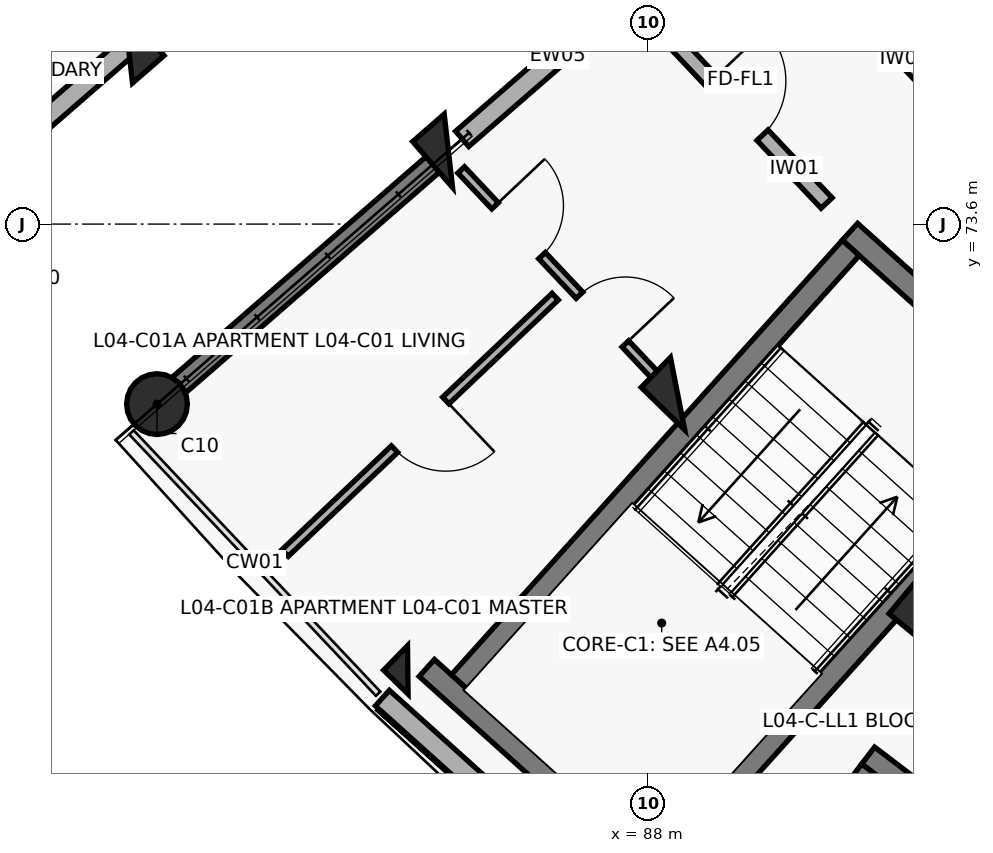
"""IFC4 building model, lengths in metres.
Left out: names, types, materials, properties, quantities, classifications, styles, units other than length and angle.
Written with IfcOpenShell. Run it as: python <this file> out.ifc"""

import sys

from ifc_helpers import new_model, si_unit, direction, frame, frame_2d, origin, origin_2d, place, context, subcontext, project, spatial, rectangle, circle, extrude, element, fill, save


model = new_model("IFC4")
c1 = context("Model", 3, precision=1e-05, world=origin(), true_north=direction((0.0, 1.0)))
c2 = subcontext(c1, "Body", "Model", "MODEL_VIEW")
j1 = project(units=[si_unit("LENGTHUNIT", "METRE"), si_unit("PLANEANGLEUNIT", "RADIAN")], contexts=[c1])
p1 = place(None, origin())
s1 = spatial("IfcSite", under=j1, at=p1, CompositionType="ELEMENT")
p2 = place(p1, origin())
s2 = spatial("IfcBuilding", under=s1, at=p2, CompositionType="ELEMENT")
p3 = place(p2, frame((0.0, 0.0, 14.3)))
s3 = spatial("IfcBuildingStorey", under=s2, at=p3, CompositionType="ELEMENT", Elevation=14.3)
for number, where, z_axis, x_axis in (
    (1, (81.166, 75.938, 0.0), (0.0, 0.0, 1.0), (0.755, 0.656, 0.0)),
    (2, (85.377, 74.564, 0.0), (0.0, 0.0, 1.0), (-0.755, -0.656, 0.0)),
):
    element("IfcColumn", number, at=place(p3, frame(where, z_axis=z_axis, x_axis=x_axis)), inside=s3, PredefinedType="COLUMN", context=c2, shape_type="SweptSolid", body=[
        extrude(rectangle(XDim=0.55, YDim=0.8, at=origin_2d()), origin(), (0.0, 0.0, 1.0), 3.1),
    ])
p4 = place(p3, frame((81.543, 71.231, 0.0), z_axis=(0.0, 0.0, 1.0), x_axis=(-0.754709580223, -0.656059028991, 0.0)))
e3 = element("IfcColumn", 3, at=p4, inside=s3, PredefinedType="COLUMN", context=c2, shape_type="SweptSolid", body=[
    extrude(circle(Radius=0.4, at=origin_2d()), origin(), (0.0, 0.0, 1.0), 3.1),
])
p5 = place(p3, frame((88.392, 71.369, 0.0), z_axis=(0.0, 0.0, 1.0), x_axis=(-0.698665066769, -0.715448897181, 0.0)))
e4 = element("IfcColumn", 4, at=p5, inside=s3, PredefinedType="COLUMN", context=c2, shape_type="SweptSolid", body=[
    extrude(rectangle(XDim=0.55, YDim=0.8, at=origin_2d()), origin(), (0.0, 0.0, 1.0), 3.1),
])
p6 = place(p3, frame((84.843, 67.734, 0.0), z_axis=(0.0, 0.0, 1.0), x_axis=(-0.698665066769, -0.715448897181, 0.0)))
e5 = element("IfcColumn", 5, at=p6, inside=s3, PredefinedType="COLUMN", context=c2, shape_type="SweptSolid", body=[
    extrude(rectangle(XDim=0.45, YDim=0.45, at=origin_2d()), origin(), (0.0, 0.0, 1.0), 3.1),
])
p7 = place(p3, frame((91.658, 68.43, 0.0), z_axis=(0.0, 0.0, 1.0), x_axis=(-0.637961754089, -0.770068049148, 0.0)))
e6 = element("IfcColumn", 6, at=p7, inside=s3, PredefinedType="COLUMN", context=c2, shape_type="SweptSolid", body=[
    extrude(rectangle(XDim=0.55, YDim=0.8, at=origin_2d()), origin(), (0.0, 0.0, 1.0), 3.1),
])
p8 = place(p3, frame((85.241, 74.446, 0.0), z_axis=(0.0, 0.0, 1.0), x_axis=(-0.754703505217, -0.65606601742, 0.0)))
e7 = element("IfcWall", 7, at=p8, inside=s3, PredefinedType="SHEAR", context=c2, shape_type="SweptSolid", body=[
    extrude(rectangle(XDim=4.72, YDim=0.27, at=frame_2d((2.36, 0.0))), origin(), (0.0, 0.0, 1.0), 2.86),
])
p9 = place(p3, frame((79.234, 74.259, 0.0), z_axis=(0.0, 0.0, 1.0), x_axis=(0.754717680958, 0.656049710044, 0.0)))
e8 = element("IfcWall", 8, at=p9, inside=s3, PredefinedType="SOLIDWALL", context=c2, shape_type="SweptSolid", body=[
    extrude(rectangle(XDim=8.2, YDim=0.265, at=frame_2d((4.1, 0.0))), origin(), (0.0, 0.0, 1.0), 2.08),
])
p10 = place(p9, frame((3.59, 0.0, 0.75)))
e9 = element("IfcOpeningElement", 9, at=p10, cuts=e8, PredefinedType="OPENING", context=c2, shape_type="SweptSolid", body=[
    extrude(rectangle(XDim=1.35, YDim=1.35, at=frame_2d((0.675, 0.675))), frame((0.0, 0.142, 0.0), z_axis=(0.0, -1.0, 0.0), x_axis=(1.0, 0.0, 0.0)), (0.0, 0.0, 1.0), 0.285),
])
p11 = place(p3, frame((84.508, 67.363, 0.0), z_axis=(0.0, 0.0, 1.0), x_axis=(0.743387539862, -0.668860946369, 0.0)))
e10 = element("IfcWall", 10, at=p11, inside=s3, PredefinedType="SOLIDWALL", context=c2, shape_type="SweptSolid", body=[
    extrude(rectangle(XDim=4.809, YDim=0.275, at=frame_2d((2.405, 0.0))), origin(), (0.0, 0.0, 1.0), 2.25),
])
p12 = place(p3, frame((91.746, 80.101, 0.0), z_axis=(0.0, 0.0, 1.0), x_axis=(-0.754704866158, -0.656064451862, 0.0)))
e11 = element("IfcWall", 11, at=p12, inside=s3, PredefinedType="SOLIDWALL", context=c2, shape_type="SweptSolid", body=[
    extrude(rectangle(XDim=8.2, YDim=0.265, at=frame_2d((4.1, 0.0))), origin(), (0.0, 0.0, 1.0), 2.08),
])
p13 = place(p12, frame((3.59, 0.0, 0.75)))
e12 = element("IfcOpeningElement", 12, at=p13, cuts=e11, PredefinedType="OPENING", context=c2, shape_type="SweptSolid", body=[
    extrude(rectangle(XDim=1.35, YDim=1.35, at=frame_2d((0.675, 0.675))), frame((0.0, 0.142, 0.0), z_axis=(0.0, -1.0, 0.0), x_axis=(1.0, 0.0, 0.0)), (0.0, 0.0, 1.0), 0.285),
])
p14 = place(p3, frame((90.66, 73.499, 0.0), z_axis=(0.0, 0.0, 1.0), x_axis=(0.743375696158, -0.668874109501, 0.0)))
e13 = element("IfcWall", 13, at=p14, inside=s3, PredefinedType="SHEAR", context=c2, shape_type="SweptSolid", body=[
    extrude(rectangle(XDim=3.87, YDim=0.3, at=frame_2d((1.935, 0.0))), origin(), (0.0, 0.0, 1.0), 3.1),
])
p15 = place(p14, frame((1.41, 0.0, 0.0)))
e14 = element("IfcOpeningElement", 14, at=p15, cuts=e13, PredefinedType="OPENING", context=c2, shape_type="SweptSolid", body=[
    extrude(rectangle(XDim=1.05, YDim=2.15, at=frame_2d((0.525, 1.075))), frame((0.0, 0.16, 0.0), z_axis=(0.0, -1.0, 0.0), x_axis=(1.0, 0.0, 0.0)), (0.0, 0.0, 1.0), 0.32),
])
p16 = place(p3, frame((85.093, 67.76, 0.0), z_axis=(0.0, 0.0, 1.0), x_axis=(0.743372896184, -0.668877221333, 0.0)))
e15 = element("IfcWall", 15, at=p16, inside=s3, PredefinedType="SHEAR", context=c2, shape_type="SweptSolid", body=[
    extrude(rectangle(XDim=4.47, YDim=0.3, at=frame_2d((2.235, 0.0))), origin(), (0.0, 0.0, 1.0), 3.1),
])
p17 = place(p3, frame((90.671, 73.287, 0.0), z_axis=(0.0, 0.0, 1.0), x_axis=(-0.668885797871, -0.743365179038, 0.0)))
e16 = element("IfcWall", 16, at=p17, inside=s3, PredefinedType="SHEAR", context=c2, shape_type="SweptSolid", body=[
    extrude(rectangle(XDim=7.69, YDim=0.3, at=frame_2d((3.845, 0.0))), origin(), (0.0, 0.0, 1.0), 3.1),
])
p18 = place(p3, frame((93.325, 70.899, 0.0), z_axis=(0.0, 0.0, 1.0), x_axis=(-0.668868253964, -0.743380964808, 0.0)))
e17 = element("IfcWall", 17, at=p18, inside=s3, PredefinedType="SHEAR", context=c2, shape_type="SweptSolid", body=[
    extrude(rectangle(XDim=7.69, YDim=0.3, at=frame_2d((3.845, 0.0))), origin(), (0.0, 0.0, 1.0), 3.1),
])
p19 = place(p3, frame((90.899, 66.607, 0.0), z_axis=(0.0, 0.0, 1.0), x_axis=(0.795439986025, -0.606032365994, 0.0)))
e18 = element("IfcWall", 18, at=p19, inside=s3, PredefinedType="SHEAR", context=c2, shape_type="SweptSolid", body=[
    extrude(rectangle(XDim=3.39, YDim=0.28, at=frame_2d((1.695, 0.0))), origin(), (0.0, 0.0, 1.0), 3.1),
])
p20 = place(p19, frame((1.095, 0.0, 0.0)))
e19 = element("IfcOpeningElement", 19, at=p20, cuts=e18, PredefinedType="OPENING", context=c2, shape_type="SweptSolid", body=[
    extrude(rectangle(XDim=1.2, YDim=2.15, at=frame_2d((0.6, 1.075))), frame((0.0, 0.15, 0.0), z_axis=(0.0, -1.0, 0.0), x_axis=(1.0, 0.0, 0.0)), (0.0, 0.0, 1.0), 0.3),
])
p21 = place(p3, frame((90.926, 66.411, 0.0), z_axis=(0.0, 0.0, 1.0), x_axis=(-0.605948992168, -0.795503500238, 0.0)))
e20 = element("IfcWall", 20, at=p21, inside=s3, PredefinedType="SHEAR", context=c2, shape_type="SweptSolid", body=[
    extrude(rectangle(XDim=2.03, YDim=0.28, at=frame_2d((1.015, 0.0))), origin(), (0.0, 0.0, 1.0), 3.1),
])
p22 = place(p3, frame((87.994, 76.376, 0.0), z_axis=(0.0, 0.0, 1.0), x_axis=(0.686310507227, -0.727308660522, 0.0)))
e21 = element("IfcWall", 21, at=p22, inside=s3, PredefinedType="SOLIDWALL", context=c2, shape_type="SweptSolid", body=[
    extrude(rectangle(XDim=3.436, YDim=0.2, at=frame_2d((1.718, 0.0))), origin(), (0.0, 0.0, 1.0), 2.08),
])
p23 = place(p22, frame((1.228, 0.0, 0.0)))
e22 = element("IfcOpeningElement", 22, at=p23, cuts=e21, PredefinedType="OPENING", context=c2, shape_type="SweptSolid", body=[
    extrude(rectangle(XDim=0.98, YDim=2.15, at=frame_2d((0.49, 1.075))), frame((0.0, 0.11, 0.0), z_axis=(0.0, -1.0, 0.0), x_axis=(1.0, 0.0, 0.0)), (0.0, 0.0, 1.0), 0.22),
])
p24 = place(p3, frame((89.541, 77.721, 0.0), z_axis=(0.0, 0.0, 1.0), x_axis=(0.686344941052, -0.727276166179, 0.0)))
e23 = element("IfcWall", 23, at=p24, inside=s3, PredefinedType="SOLIDWALL", context=c2, shape_type="SweptSolid", body=[
    extrude(rectangle(XDim=3.269, YDim=0.19, at=frame_2d((1.634, 0.0))), origin(), (0.0, 0.0, 1.0), 2.08),
])
p25 = place(p24, frame((1.184, 0.0, 0.0)))
e24 = element("IfcOpeningElement", 24, at=p25, cuts=e23, PredefinedType="OPENING", context=c2, shape_type="SweptSolid", body=[
    extrude(rectangle(XDim=0.9, YDim=2.1, at=frame_2d((0.45, 1.05))), frame((0.0, 0.105, 0.0), z_axis=(0.0, -1.0, 0.0), x_axis=(1.0, 0.0, 0.0)), (0.0, 0.0, 1.0), 0.21),
])
p26 = place(p3, frame((85.545, 74.313, 0.0), z_axis=(0.0, 0.0, 1.0), x_axis=(0.686332741542, -0.727287678906, 0.0)))
e25 = element("IfcWall", 25, at=p26, inside=s3, PredefinedType="PARTITIONING", context=c2, shape_type="SweptSolid", body=[
    extrude(rectangle(XDim=3.797, YDim=0.12, at=frame_2d((1.899, 0.0))), origin(), (0.0, 0.0, 1.0), 2.08),
])
p27 = place(p26, frame((0.65, 0.0, 0.0)))
e26 = element("IfcOpeningElement", 26, at=p27, cuts=e25, PredefinedType="OPENING", context=c2, shape_type="SweptSolid", body=[
    extrude(rectangle(XDim=0.9, YDim=2.1, at=frame_2d((0.45, 1.05))), frame((0.0, 0.07, 0.0), z_axis=(0.0, -1.0, 0.0), x_axis=(1.0, 0.0, 0.0)), (0.0, 0.0, 1.0), 0.14),
])
p28 = place(p26, frame((2.267, 0.0, 0.0)))
e27 = element("IfcOpeningElement", 27, at=p28, cuts=e25, PredefinedType="OPENING", context=c2, shape_type="SweptSolid", body=[
    extrude(rectangle(XDim=0.88, YDim=2.1, at=frame_2d((0.44, 1.05))), frame((0.0, 0.07, 0.0), z_axis=(0.0, -1.0, 0.0), x_axis=(1.0, 0.0, 0.0)), (0.0, 0.0, 1.0), 0.14),
])
p29 = place(p3, frame((86.782, 72.646, 0.0), z_axis=(0.0, 0.0, 1.0), x_axis=(-0.725204659953, -0.688533369694, 0.0)))
e28 = element("IfcWall", 28, at=p29, inside=s3, PredefinedType="PARTITIONING", context=c2, shape_type="SweptSolid", body=[
    extrude(rectangle(XDim=4.9, YDim=0.12, at=frame_2d((2.45, 0.0))), origin(), (0.0, 0.0, 1.0), 2.08),
])
p30 = place(p29, frame((1.985, 0.0, 0.0)))
e29 = element("IfcOpeningElement", 29, at=p30, cuts=e28, PredefinedType="OPENING", context=c2, shape_type="SweptSolid", body=[
    extrude(rectangle(XDim=0.93, YDim=2.1, at=frame_2d((0.465, 1.05))), frame((0.0, 0.07, 0.0), z_axis=(0.0, -1.0, 0.0), x_axis=(1.0, 0.0, 0.0)), (0.0, 0.0, 1.0), 0.14),
])
p31 = place(p23, origin())
e30 = element("IfcDoor", 30, at=p31, inside=s3, OperationType="SINGLE_SWING_LEFT", PredefinedType="DOOR", context=c2, shape_type="SweptSolid", body=[
    extrude(rectangle(XDim=0.98, YDim=2.15, at=frame_2d((0.49, 1.075))), frame((0.0, 0.025, 0.0), z_axis=(0.0, -1.0, 0.0), x_axis=(1.0, 0.0, 0.0)), (0.0, 0.0, 1.0), 0.05),
])
fill(e22, e30)
p32 = place(p27, origin())
e31 = element("IfcDoor", 31, at=p32, inside=s3, OperationType="SINGLE_SWING_LEFT", PredefinedType="DOOR", context=c2, shape_type="SweptSolid", body=[
    extrude(rectangle(XDim=0.9, YDim=2.1, at=frame_2d((0.45, 1.05))), frame((0.0, 0.025, 0.0), z_axis=(0.0, -1.0, 0.0), x_axis=(1.0, 0.0, 0.0)), (0.0, 0.0, 1.0), 0.05),
])
fill(e26, e31)
p33 = place(p28, origin())
e32 = element("IfcDoor", 32, at=p33, inside=s3, OperationType="SINGLE_SWING_RIGHT", PredefinedType="DOOR", context=c2, shape_type="SweptSolid", body=[
    extrude(rectangle(XDim=0.88, YDim=2.1, at=frame_2d((0.44, 1.05))), frame((0.0, 0.025, 0.0), z_axis=(0.0, -1.0, 0.0), x_axis=(1.0, 0.0, 0.0)), (0.0, 0.0, 1.0), 0.05),
])
fill(e27, e32)
p34 = place(p30, origin())
e33 = element("IfcDoor", 33, at=p34, inside=s3, OperationType="SINGLE_SWING_LEFT", PredefinedType="DOOR", context=c2, shape_type="SweptSolid", body=[
    extrude(rectangle(XDim=0.93, YDim=2.1, at=frame_2d((0.465, 1.05))), frame((0.0, 0.025, 0.0), z_axis=(0.0, -1.0, 0.0), x_axis=(1.0, 0.0, 0.0)), (0.0, 0.0, 1.0), 0.05),
])
fill(e29, e33)
save(model, sys.argv[1])
